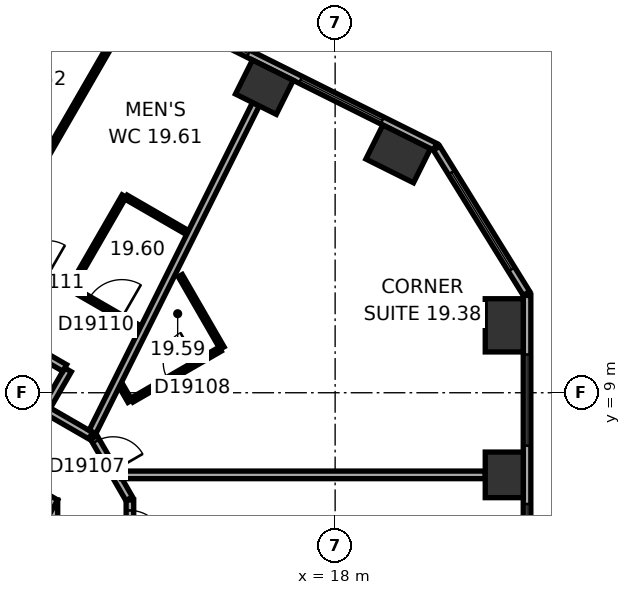
"""IFC4 building model, lengths in metres.
Left out: names, types, materials, properties, quantities, classifications, styles, units other than length and angle.
Written with IfcOpenShell. Run it as: python <this file> out.ifc"""

import sys

from ifc_helpers import new_model, si_unit, direction, frame, frame_2d, origin, origin_2d, place, context, subcontext, project, spatial, rectangle, extrude, element, fill, save


model = new_model("IFC4")
c1 = context("Model", 3, precision=1e-05, world=origin(), true_north=direction((0.0, 1.0)))
c2 = subcontext(c1, "Body", "Model", "MODEL_VIEW")
j1 = project(units=[si_unit("LENGTHUNIT", "METRE"), si_unit("PLANEANGLEUNIT", "RADIAN")], contexts=[c1])
p1 = place(None, origin())
s1 = spatial("IfcSite", under=j1, at=p1, CompositionType="ELEMENT")
p2 = place(p1, origin())
s2 = spatial("IfcBuilding", under=s1, at=p2, CompositionType="ELEMENT")
p3 = place(p2, frame((0.0, 0.0, 86.9)))
s3 = spatial("IfcBuildingStorey", under=s2, at=p3, CompositionType="ELEMENT", Elevation=86.9)
p4 = place(p3, frame((22.45, 6.839, 0.0), z_axis=(0.0, 0.0, 1.0), x_axis=(0.0, 1.0, 0.0)))
e1 = element("IfcColumn", 1, at=p4, inside=s3, PredefinedType="COLUMN", context=c2, shape_type="SweptSolid", body=[
    extrude(rectangle(XDim=1.2, YDim=1.0, at=origin_2d()), origin(), (0.0, 0.0, 1.0), 3.3),
])
for number, where, z_axis, x_axis in (
    (2, (22.45, 10.774, 0.0), (0.0, 0.0, 1.0), (0.0, 1.0, 0.0)),
    (3, (19.659, 15.284, 0.0), (0.0, 0.0, 1.0), (-0.895, 0.446, 0.0)),
):
    element("IfcColumn", number, at=place(p3, frame(where, z_axis=z_axis, x_axis=x_axis)), inside=s3, PredefinedType="COLUMN", context=c2, shape_type="SweptSolid", body=[
        extrude(rectangle(XDim=1.4, YDim=1.0, at=origin_2d()), origin(), (0.0, 0.0, 1.0), 3.3),
    ])
p5 = place(p3, frame((16.138, 17.04, 0.0), z_axis=(0.0, 0.0, 1.0), x_axis=(-0.894934361602, 0.44619781311, 0.0)))
e4 = element("IfcColumn", 4, at=p5, inside=s3, PredefinedType="COLUMN", context=c2, shape_type="SweptSolid", body=[
    extrude(rectangle(XDim=1.2, YDim=1.0, at=origin_2d()), origin(), (0.0, 0.0, 1.0), 3.3),
])
p6 = place(p3, frame((10.1, -6.177, 0.0), z_axis=(0.0, 0.0, 1.0), x_axis=(0.0, 1.0, 0.0)))
e5 = element("IfcWall", 5, at=p6, inside=s3, PredefinedType="SHEAR", context=c2, shape_type="SweptSolid", body=[
    extrude(rectangle(XDim=12.355, YDim=1.2, at=frame_2d((6.177, 0.0))), origin(), (0.0, 0.0, 1.0), 3.3),
])
p7 = place(p6, frame((6.378, 0.0, 0.0)))
e6 = element("IfcOpeningElement", 6, at=p7, cuts=e5, PredefinedType="OPENING", context=c2, shape_type="SweptSolid", body=[
    extrude(rectangle(XDim=1.5, YDim=2.1, at=frame_2d((0.75, 1.05))), frame((0.0, 0.61, 0.0), z_axis=(0.0, -1.0, 0.0), x_axis=(1.0, 0.0, 0.0)), (0.0, 0.0, 1.0), 1.22),
])
p8 = place(p6, frame((1.828, 0.0, 0.0)))
e7 = element("IfcOpeningElement", 7, at=p8, cuts=e5, PredefinedType="OPENING", context=c2, shape_type="SweptSolid", body=[
    extrude(rectangle(XDim=1.1, YDim=2.1, at=frame_2d((0.55, 1.05))), frame((0.0, 0.61, 0.0), z_axis=(0.0, -1.0, 0.0), x_axis=(1.0, 0.0, 0.0)), (0.0, 0.0, 1.0), 1.22),
])
p9 = place(p6, frame((4.427, 0.0, 0.0)))
e8 = element("IfcOpeningElement", 8, at=p9, cuts=e5, PredefinedType="OPENING", context=c2, shape_type="SweptSolid", body=[
    extrude(rectangle(XDim=1.1, YDim=2.1, at=frame_2d((0.55, 1.05))), frame((0.0, 0.61, 0.0), z_axis=(0.0, -1.0, 0.0), x_axis=(1.0, 0.0, 0.0)), (0.0, 0.0, 1.0), 1.22),
])
p10 = place(p3, frame((10.4, 5.658, 0.0), z_axis=(0.0, 0.0, 1.0), x_axis=(-0.866021384402, 0.500006961711, 0.0)))
e9 = element("IfcWall", 9, at=p10, inside=s3, PredefinedType="SHEAR", context=c2, shape_type="SweptSolid", body=[
    extrude(rectangle(XDim=12.355, YDim=1.2, at=frame_2d((6.178, 0.0))), origin(), (0.0, 0.0, 1.0), 3.3),
])
p11 = place(p10, frame((2.728, 0.0, 0.0)))
e10 = element("IfcOpeningElement", 10, at=p11, cuts=e9, PredefinedType="OPENING", context=c2, shape_type="SweptSolid", body=[
    extrude(rectangle(XDim=1.1, YDim=2.1, at=frame_2d((0.55, 1.05))), frame((0.0, 0.61, 0.0), z_axis=(0.0, -1.0, 0.0), x_axis=(1.0, 0.0, 0.0)), (0.0, 0.0, 1.0), 1.22),
])
p12 = place(p10, frame((5.328, 0.0, 0.0)))
e11 = element("IfcOpeningElement", 11, at=p12, cuts=e9, PredefinedType="OPENING", context=c2, shape_type="SweptSolid", body=[
    extrude(rectangle(XDim=1.1, YDim=2.1, at=frame_2d((0.55, 1.05))), frame((0.0, 0.61, 0.0), z_axis=(0.0, -1.0, 0.0), x_axis=(1.0, 0.0, 0.0)), (0.0, 0.0, 1.0), 1.22),
])
p13 = place(p10, frame((7.928, 0.0, 0.0)))
e12 = element("IfcOpeningElement", 12, at=p13, cuts=e9, PredefinedType="OPENING", context=c2, shape_type="SweptSolid", body=[
    extrude(rectangle(XDim=1.1, YDim=2.1, at=frame_2d((0.55, 1.05))), frame((0.0, 0.61, 0.0), z_axis=(0.0, -1.0, 0.0), x_axis=(1.0, 0.0, 0.0)), (0.0, 0.0, 1.0), 1.22),
])
p14 = place(p3, frame((23.05, -9.687, 0.0), z_axis=(0.0, 0.0, 1.0), x_axis=(0.0, 1.0, 0.0)))
e13 = element("IfcWall", 13, at=p14, inside=s3, PredefinedType="STANDARD", context=c2, shape_type="SweptSolid", body=[
    extrude(rectangle(XDim=21.246, YDim=0.2, at=frame_2d((10.623, 0.0))), origin(), (0.0, 0.0, 1.0), 3.3),
])
p15 = place(p14, frame((1.555, 0.0, 0.8)))
e14 = element("IfcOpeningElement", 14, at=p15, cuts=e13, PredefinedType="OPENING", context=c2, shape_type="SweptSolid", body=[
    extrude(rectangle(XDim=2.4, YDim=1.7, at=frame_2d((1.2, 0.85))), frame((0.0, 0.11, 0.0), z_axis=(0.0, -1.0, 0.0), x_axis=(1.0, 0.0, 0.0)), (0.0, 0.0, 1.0), 0.22),
])
p16 = place(p14, frame((5.489, 0.0, 0.8)))
e15 = element("IfcOpeningElement", 15, at=p16, cuts=e13, PredefinedType="OPENING", context=c2, shape_type="SweptSolid", body=[
    extrude(rectangle(XDim=2.4, YDim=1.7, at=frame_2d((1.2, 0.85))), frame((0.0, 0.11, 0.0), z_axis=(0.0, -1.0, 0.0), x_axis=(1.0, 0.0, 0.0)), (0.0, 0.0, 1.0), 0.22),
])
p17 = place(p14, frame((9.424, 0.0, 0.8)))
e16 = element("IfcOpeningElement", 16, at=p17, cuts=e13, PredefinedType="OPENING", context=c2, shape_type="SweptSolid", body=[
    extrude(rectangle(XDim=2.4, YDim=1.7, at=frame_2d((1.2, 0.85))), frame((0.0, 0.11, 0.0), z_axis=(0.0, -1.0, 0.0), x_axis=(1.0, 0.0, 0.0)), (0.0, 0.0, 1.0), 0.22),
])
p18 = place(p14, frame((13.358, 0.0, 0.8)))
e17 = element("IfcOpeningElement", 17, at=p18, cuts=e13, PredefinedType="OPENING", context=c2, shape_type="SweptSolid", body=[
    extrude(rectangle(XDim=2.4, YDim=1.7, at=frame_2d((1.2, 0.85))), frame((0.0, 0.11, 0.0), z_axis=(0.0, -1.0, 0.0), x_axis=(1.0, 0.0, 0.0)), (0.0, 0.0, 1.0), 0.22),
])
p19 = place(p14, frame((17.293, 0.0, 0.8)))
e18 = element("IfcOpeningElement", 18, at=p19, cuts=e13, PredefinedType="OPENING", context=c2, shape_type="SweptSolid", body=[
    extrude(rectangle(XDim=2.4, YDim=1.7, at=frame_2d((1.2, 0.85))), frame((0.0, 0.11, 0.0), z_axis=(0.0, -1.0, 0.0), x_axis=(1.0, 0.0, 0.0)), (0.0, 0.0, 1.0), 0.22),
])
p20 = place(p3, frame((23.035, 11.612, 0.0), z_axis=(0.0, 0.0, 1.0), x_axis=(-0.526160091227, 0.850385535155, 0.0)))
e19 = element("IfcWall", 19, at=p20, inside=s3, PredefinedType="STANDARD", context=c2, shape_type="SweptSolid", body=[
    extrude(rectangle(XDim=4.494, YDim=0.2, at=frame_2d((2.247, 0.0))), origin(), (0.0, 0.0, 1.0), 3.3),
])
p21 = place(p20, frame((0.747, 0.0, 0.8)))
e20 = element("IfcOpeningElement", 20, at=p21, cuts=e19, PredefinedType="OPENING", context=c2, shape_type="SweptSolid", body=[
    extrude(rectangle(XDim=3.0, YDim=1.7, at=frame_2d((1.5, 0.85))), frame((0.0, 0.11, 0.0), z_axis=(0.0, -1.0, 0.0), x_axis=(1.0, 0.0, 0.0)), (0.0, 0.0, 1.0), 0.22),
])
p22 = place(p3, frame((20.63, 15.47, 0.0), z_axis=(0.0, 0.0, 1.0), x_axis=(-0.894934518609, 0.446197498203, 0.0)))
e21 = element("IfcWall", 21, at=p22, inside=s3, PredefinedType="STANDARD", context=c2, shape_type="SweptSolid", body=[
    extrude(rectangle(XDim=21.246, YDim=0.2, at=frame_2d((10.623, 0.0))), origin(), (0.0, 0.0, 1.0), 3.3),
])
p23 = place(p22, frame((1.553, 0.0, 0.8)))
e22 = element("IfcOpeningElement", 22, at=p23, cuts=e21, PredefinedType="OPENING", context=c2, shape_type="SweptSolid", body=[
    extrude(rectangle(XDim=2.4, YDim=1.7, at=frame_2d((1.2, 0.85))), frame((0.0, 0.11, 0.0), z_axis=(0.0, -1.0, 0.0), x_axis=(1.0, 0.0, 0.0)), (0.0, 0.0, 1.0), 0.22),
])
p24 = place(p22, frame((5.488, 0.0, 0.8)))
e23 = element("IfcOpeningElement", 23, at=p24, cuts=e21, PredefinedType="OPENING", context=c2, shape_type="SweptSolid", body=[
    extrude(rectangle(XDim=2.4, YDim=1.7, at=frame_2d((1.2, 0.85))), frame((0.0, 0.11, 0.0), z_axis=(0.0, -1.0, 0.0), x_axis=(1.0, 0.0, 0.0)), (0.0, 0.0, 1.0), 0.22),
])
p25 = place(p22, frame((9.422, 0.0, 0.8)))
e24 = element("IfcOpeningElement", 24, at=p25, cuts=e21, PredefinedType="OPENING", context=c2, shape_type="SweptSolid", body=[
    extrude(rectangle(XDim=2.4, YDim=1.7, at=frame_2d((1.2, 0.85))), frame((0.0, 0.11, 0.0), z_axis=(0.0, -1.0, 0.0), x_axis=(1.0, 0.0, 0.0)), (0.0, 0.0, 1.0), 0.22),
])
p26 = place(p22, frame((13.357, 0.0, 0.8)))
e25 = element("IfcOpeningElement", 25, at=p26, cuts=e21, PredefinedType="OPENING", context=c2, shape_type="SweptSolid", body=[
    extrude(rectangle(XDim=2.4, YDim=1.7, at=frame_2d((1.2, 0.85))), frame((0.0, 0.11, 0.0), z_axis=(0.0, -1.0, 0.0), x_axis=(1.0, 0.0, 0.0)), (0.0, 0.0, 1.0), 0.22),
])
p27 = place(p22, frame((17.292, 0.0, 0.8)))
e26 = element("IfcOpeningElement", 26, at=p27, cuts=e21, PredefinedType="OPENING", context=c2, shape_type="SweptSolid", body=[
    extrude(rectangle(XDim=2.4, YDim=1.7, at=frame_2d((1.2, 0.85))), frame((0.0, 0.11, 0.0), z_axis=(0.0, -1.0, 0.0), x_axis=(1.0, 0.0, 0.0)), (0.0, 0.0, 1.0), 0.22),
])
p28 = place(p3, frame((10.371, 8.561, 0.0), z_axis=(0.0, 0.0, 1.0), x_axis=(0.499986357472, 0.866033280158, 0.0)))
e27 = element("IfcWall", 27, at=p28, inside=s3, PredefinedType="PARTITIONING", context=c2, shape_type="SweptSolid", body=[
    extrude(rectangle(XDim=1.201, YDim=0.2, at=frame_2d((0.601, 0.0))), origin(), (0.0, 0.0, 1.0), 3.05),
])
p29 = place(p3, frame((10.885, 9.652, 0.0), z_axis=(0.0, 0.0, 1.0), x_axis=(-0.866033868542, 0.499985338323, 0.0)))
e28 = element("IfcWall", 28, at=p29, inside=s3, PredefinedType="PARTITIONING", context=c2, shape_type="SweptSolid", body=[
    extrude(rectangle(XDim=8.602, YDim=0.2, at=frame_2d((4.301, 0.0))), origin(), (0.0, 0.0, 1.0), 3.05),
])
p30 = place(p29, frame((2.739, 0.0, 0.0)))
e29 = element("IfcOpeningElement", 29, at=p30, cuts=e28, PredefinedType="OPENING", context=c2, shape_type="SweptSolid", body=[
    extrude(rectangle(XDim=1.0, YDim=2.1, at=frame_2d((0.5, 1.05))), frame((0.0, 0.11, 0.0), z_axis=(0.0, -1.0, 0.0), x_axis=(1.0, 0.0, 0.0)), (0.0, 0.0, 1.0), 0.22),
])
p31 = place(p3, frame((11.566, 7.871, 0.0), z_axis=(0.0, 0.0, 1.0), x_axis=(-0.866004557827, 0.500036104519, 0.0)))
e30 = element("IfcWall", 30, at=p31, inside=s3, PredefinedType="PARTITIONING", context=c2, shape_type="SweptSolid", body=[
    extrude(rectangle(XDim=1.28, YDim=0.2, at=frame_2d((0.64, 0.0))), origin(), (0.0, 0.0, 1.0), 3.05),
])
p32 = place(p3, frame((12.243, 18.423, 0.0), z_axis=(0.0, 0.0, 1.0), x_axis=(-0.499993523031, -0.866029143232, 0.0)))
e31 = element("IfcWall", 31, at=p32, inside=s3, PredefinedType="PARTITIONING", context=c2, shape_type="SweptSolid", body=[
    extrude(rectangle(XDim=6.315, YDim=0.12, at=frame_2d((3.157, 0.0))), origin(), (0.0, 0.0, 1.0), 2.6),
])
p33 = place(p3, frame((12.448, 14.177, 0.0), z_axis=(0.0, 0.0, 1.0), x_axis=(-0.500048966069, -0.865997131366, 0.0)))
e32 = element("IfcWall", 32, at=p33, inside=s3, PredefinedType="PARTITIONING", context=c2, shape_type="SweptSolid", body=[
    extrude(rectangle(XDim=2.74, YDim=0.12, at=frame_2d((1.37, 0.0))), origin(), (0.0, 0.0, 1.0), 3.05),
])
p34 = place(p3, frame((12.58, 6.212, 0.0), z_axis=(0.0, 0.0, 1.0), x_axis=(-0.500063286585, 0.865988862174, 0.0)))
e33 = element("IfcWall", 33, at=p34, inside=s3, PredefinedType="PARTITIONING", context=c2, shape_type="SweptSolid", body=[
    extrude(rectangle(XDim=1.86, YDim=0.2, at=frame_2d((0.93, 0.0))), origin(), (0.0, 0.0, 1.0), 3.05),
])
p35 = place(p34, frame((0.842, 0.0, 0.0)))
e34 = element("IfcOpeningElement", 34, at=p35, cuts=e33, PredefinedType="OPENING", context=c2, shape_type="SweptSolid", body=[
    extrude(rectangle(XDim=0.9, YDim=2.1, at=frame_2d((0.45, 1.05))), frame((0.0, 0.11, 0.0), z_axis=(0.0, -1.0, 0.0), x_axis=(1.0, 0.0, 0.0)), (0.0, 0.0, 1.0), 0.22),
])
p36 = place(p3, frame((12.6, 3.004, 0.0), z_axis=(0.0, 0.0, 1.0), x_axis=(0.0, 1.0, 0.0)))
e35 = element("IfcWall", 35, at=p36, inside=s3, PredefinedType="PARTITIONING", context=c2, shape_type="SweptSolid", body=[
    extrude(rectangle(XDim=3.173, YDim=0.2, at=frame_2d((1.586, 0.0))), origin(), (0.0, 0.0, 1.0), 3.05),
])
p37 = place(p36, frame((1.998, 0.0, 0.0)))
e36 = element("IfcOpeningElement", 36, at=p37, cuts=e35, PredefinedType="OPENING", context=c2, shape_type="SweptSolid", body=[
    extrude(rectangle(XDim=0.9, YDim=2.1, at=frame_2d((0.45, 1.05))), frame((0.0, 0.11, 0.0), z_axis=(0.0, -1.0, 0.0), x_axis=(1.0, 0.0, 0.0)), (0.0, 0.0, 1.0), 0.22),
])
p38 = place(p3, frame((12.601, 8.776, 0.0), z_axis=(0.0, 0.0, 1.0), x_axis=(-0.500166486798, 0.865929261247, 0.0)))
e37 = element("IfcWall", 37, at=p38, inside=s3, PredefinedType="PARTITIONING", context=c2, shape_type="SweptSolid", body=[
    extrude(rectangle(XDim=0.476, YDim=0.12, at=frame_2d((0.238, 0.0))), origin(), (0.0, 0.0, 1.0), 3.05),
])
p39 = place(p3, frame((12.866, 10.702, 0.0), z_axis=(0.0, 0.0, 1.0), x_axis=(-0.866023151433, 0.500003901167, 0.0)))
e38 = element("IfcWall", 38, at=p39, inside=s3, PredefinedType="PARTITIONING", context=c2, shape_type="SweptSolid", body=[
    extrude(rectangle(XDim=7.684, YDim=0.12, at=frame_2d((3.842, 0.0))), origin(), (0.0, 0.0, 1.0), 3.05),
])
p40 = place(p39, frame((0.55, 0.0, 0.0)))
e39 = element("IfcOpeningElement", 39, at=p40, cuts=e38, PredefinedType="OPENING", context=c2, shape_type="SweptSolid", body=[
    extrude(rectangle(XDim=1.0, YDim=2.1, at=frame_2d((0.5, 1.05))), frame((0.0, 0.07, 0.0), z_axis=(0.0, -1.0, 0.0), x_axis=(1.0, 0.0, 0.0)), (0.0, 0.0, 1.0), 0.14),
])
p41 = place(p39, frame((2.8, 0.0, 0.0)))
e40 = element("IfcOpeningElement", 40, at=p41, cuts=e38, PredefinedType="OPENING", context=c2, shape_type="SweptSolid", body=[
    extrude(rectangle(XDim=0.9, YDim=2.1, at=frame_2d((0.45, 1.05))), frame((0.0, 0.07, 0.0), z_axis=(0.0, -1.0, 0.0), x_axis=(1.0, 0.0, 0.0)), (0.0, 0.0, 1.0), 0.14),
])
p42 = place(p39, frame((5.592, 0.0, 0.0)))
e41 = element("IfcOpeningElement", 41, at=p42, cuts=e38, PredefinedType="OPENING", context=c2, shape_type="SweptSolid", body=[
    extrude(rectangle(XDim=0.9, YDim=2.1, at=frame_2d((0.45, 1.05))), frame((0.0, 0.07, 0.0), z_axis=(0.0, -1.0, 0.0), x_axis=(1.0, 0.0, 0.0)), (0.0, 0.0, 1.0), 0.14),
])
p43 = place(p3, frame((13.926, 12.081, 0.0), z_axis=(0.0, 0.0, 1.0), x_axis=(0.499994660107, -0.866028486751, 0.0)))
e42 = element("IfcWall", 42, at=p43, inside=s3, PredefinedType="PARTITIONING", context=c2, shape_type="SweptSolid", body=[
    extrude(rectangle(XDim=2.2, YDim=0.12, at=frame_2d((1.1, 0.0))), origin(), (0.0, 0.0, 1.0), 3.05),
])
p44 = place(p3, frame((14.118, 13.212, 0.0), z_axis=(0.0, 0.0, 1.0), x_axis=(-0.866039825209, 0.499975020527, 0.0)))
e43 = element("IfcWall", 43, at=p44, inside=s3, PredefinedType="PARTITIONING", context=c2, shape_type="SweptSolid", body=[
    extrude(rectangle(XDim=1.869, YDim=0.12, at=frame_2d((0.934, 0.0))), origin(), (0.0, 0.0, 1.0), 3.05),
])
p45 = place(p3, frame((14.974, 10.146, 0.0), z_axis=(0.0, 0.0, 1.0), x_axis=(-0.86599746015, -0.500048396672, 0.0)))
e44 = element("IfcWall", 44, at=p45, inside=s3, PredefinedType="PARTITIONING", context=c2, shape_type="SweptSolid", body=[
    extrude(rectangle(XDim=2.68, YDim=0.12, at=frame_2d((1.34, 0.0))), origin(), (0.0, 0.0, 1.0), 3.05),
])
p46 = place(p45, frame((0.69, 0.0, 0.0)))
e45 = element("IfcOpeningElement", 45, at=p46, cuts=e44, PredefinedType="OPENING", context=c2, shape_type="SweptSolid", body=[
    extrude(rectangle(XDim=0.9, YDim=2.1, at=frame_2d((0.45, 1.05))), frame((0.0, 0.07, 0.0), z_axis=(0.0, -1.0, 0.0), x_axis=(1.0, 0.0, 0.0)), (0.0, 0.0, 1.0), 0.14),
])
p47 = place(p3, frame((15.915, 16.592, 0.0), z_axis=(0.0, 0.0, 1.0), x_axis=(-0.446199736347, -0.894933402709, 0.0)))
e46 = element("IfcWall", 46, at=p47, inside=s3, PredefinedType="PARTITIONING", context=c2, shape_type="SweptSolid", body=[
    extrude(rectangle(XDim=9.635, YDim=0.2, at=frame_2d((4.817, 0.0))), origin(), (0.0, 0.0, 1.0), 3.05),
])
p48 = place(p3, frame((21.95, 6.839, 0.0), z_axis=(0.0, 0.0, 1.0), x_axis=(-1.0, 0.0, 0.0)))
e47 = element("IfcWall", 47, at=p48, inside=s3, PredefinedType="PARTITIONING", context=c2, shape_type="SweptSolid", body=[
    extrude(rectangle(XDim=9.572, YDim=0.2, at=frame_2d((4.786, 0.0))), origin(), (0.0, 0.0, 1.0), 3.05),
])
p49 = place(p18, origin())
e48 = element("IfcWindow", 48, at=p49, inside=s3, PartitioningType="SINGLE_PANEL", PredefinedType="WINDOW", context=c2, shape_type="SweptSolid", body=[
    extrude(rectangle(XDim=2.4, YDim=1.7, at=frame_2d((1.2, 0.85))), frame((0.0, 0.03, 0.0), z_axis=(0.0, -1.0, 0.0), x_axis=(1.0, 0.0, 0.0)), (0.0, 0.0, 1.0), 0.06),
])
fill(e17, e48)
p50 = place(p19, origin())
e49 = element("IfcWindow", 49, at=p50, inside=s3, PartitioningType="SINGLE_PANEL", PredefinedType="WINDOW", context=c2, shape_type="SweptSolid", body=[
    extrude(rectangle(XDim=2.4, YDim=1.7, at=frame_2d((1.2, 0.85))), frame((0.0, 0.03, 0.0), z_axis=(0.0, -1.0, 0.0), x_axis=(1.0, 0.0, 0.0)), (0.0, 0.0, 1.0), 0.06),
])
fill(e18, e49)
p51 = place(p21, origin())
e50 = element("IfcWindow", 50, at=p51, inside=s3, PartitioningType="SINGLE_PANEL", PredefinedType="WINDOW", context=c2, shape_type="SweptSolid", body=[
    extrude(rectangle(XDim=3.0, YDim=1.7, at=frame_2d((1.5, 0.85))), frame((0.0, 0.03, 0.0), z_axis=(0.0, -1.0, 0.0), x_axis=(1.0, 0.0, 0.0)), (0.0, 0.0, 1.0), 0.06),
])
fill(e20, e50)
p52 = place(p23, origin())
e51 = element("IfcWindow", 51, at=p52, inside=s3, PartitioningType="SINGLE_PANEL", PredefinedType="WINDOW", context=c2, shape_type="SweptSolid", body=[
    extrude(rectangle(XDim=2.4, YDim=1.7, at=frame_2d((1.2, 0.85))), frame((0.0, 0.03, 0.0), z_axis=(0.0, -1.0, 0.0), x_axis=(1.0, 0.0, 0.0)), (0.0, 0.0, 1.0), 0.06),
])
fill(e22, e51)
p53 = place(p24, origin())
e52 = element("IfcWindow", 52, at=p53, inside=s3, PartitioningType="SINGLE_PANEL", PredefinedType="WINDOW", context=c2, shape_type="SweptSolid", body=[
    extrude(rectangle(XDim=2.4, YDim=1.7, at=frame_2d((1.2, 0.85))), frame((0.0, 0.03, 0.0), z_axis=(0.0, -1.0, 0.0), x_axis=(1.0, 0.0, 0.0)), (0.0, 0.0, 1.0), 0.06),
])
fill(e23, e52)
p54 = place(p37, origin())
e53 = element("IfcDoor", 53, at=p54, inside=s3, OperationType="SINGLE_SWING_LEFT", PredefinedType="DOOR", context=c2, shape_type="SweptSolid", body=[
    extrude(rectangle(XDim=0.9, YDim=2.1, at=frame_2d((0.45, 1.05))), frame((0.0, 0.025, 0.0), z_axis=(0.0, -1.0, 0.0), x_axis=(1.0, 0.0, 0.0)), (0.0, 0.0, 1.0), 0.05),
])
fill(e36, e53)
p55 = place(p35, origin())
e54 = element("IfcDoor", 54, at=p55, inside=s3, OperationType="SINGLE_SWING_LEFT", PredefinedType="DOOR", context=c2, shape_type="SweptSolid", body=[
    extrude(rectangle(XDim=0.9, YDim=2.1, at=frame_2d((0.45, 1.05))), frame((0.0, 0.025, 0.0), z_axis=(0.0, -1.0, 0.0), x_axis=(1.0, 0.0, 0.0)), (0.0, 0.0, 1.0), 0.05),
])
fill(e34, e54)
p56 = place(p46, origin())
e55 = element("IfcDoor", 55, at=p56, inside=s3, OperationType="SINGLE_SWING_LEFT", PredefinedType="DOOR", context=c2, shape_type="SweptSolid", body=[
    extrude(rectangle(XDim=0.9, YDim=2.1, at=frame_2d((0.45, 1.05))), frame((0.0, 0.025, 0.0), z_axis=(0.0, -1.0, 0.0), x_axis=(1.0, 0.0, 0.0)), (0.0, 0.0, 1.0), 0.05),
])
fill(e45, e55)
p57 = place(p40, origin())
e56 = element("IfcDoor", 56, at=p57, inside=s3, OperationType="SINGLE_SWING_LEFT", PredefinedType="DOOR", context=c2, shape_type="SweptSolid", body=[
    extrude(rectangle(XDim=1.0, YDim=2.1, at=frame_2d((0.5, 1.05))), frame((0.0, 0.025, 0.0), z_axis=(0.0, -1.0, 0.0), x_axis=(1.0, 0.0, 0.0)), (0.0, 0.0, 1.0), 0.05),
])
fill(e39, e56)
save(model, sys.argv[1])
